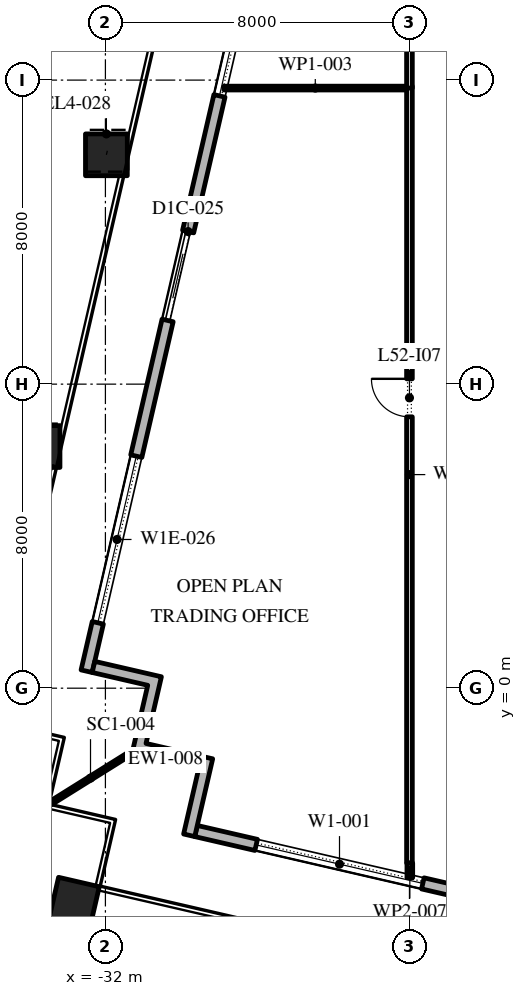
"""IFC4 building model, lengths in metres.
Left out: names, types, materials, properties, quantities, classifications, styles, units other than length and angle.
Written with IfcOpenShell. Run it as: python <this file> out.ifc"""

import sys

from ifc_helpers import new_model, si_unit, direction, frame, frame_2d, origin, origin_2d, place, context, subcontext, project, spatial, polyline, rectangle, outline, extrude, element, fill, save


model = new_model("IFC4")
c1 = context("Model", 3, precision=1e-05, world=origin(), true_north=direction((0.0, 1.0)))
c2 = subcontext(c1, "Body", "Model", "MODEL_VIEW")
j1 = project(units=[si_unit("LENGTHUNIT", "METRE"), si_unit("PLANEANGLEUNIT", "RADIAN")], contexts=[c1])
p1 = place(None, origin())
s1 = spatial("IfcSite", under=j1, at=p1, CompositionType="ELEMENT")
p2 = place(p1, origin())
s2 = spatial("IfcBuilding", under=s1, at=p2, CompositionType="ELEMENT")
p3 = place(p2, frame((0.0, 0.0, 243.0)))
s3 = spatial("IfcBuildingStorey", under=s2, at=p3, CompositionType="ELEMENT", Elevation=243.0)
p4 = place(p3, frame((-32.821, -5.635, 0.0), z_axis=(0.0, 0.0, 1.0), x_axis=(0.974370064785, -0.224951054344, 0.0)))
e1 = element("IfcColumn", 1, at=p4, inside=s3, PredefinedType="COLUMN", context=c2, shape_type="SweptSolid", body=[
    extrude(rectangle(XDim=1.1, YDim=1.1, at=origin_2d()), origin(), (0.0, 0.0, 1.0), 4.2),
])
p5 = place(p3, frame((-31.974, 14.034, 0.0), z_axis=(0.005810975449, 0.025335852957, 0.999662106474), x_axis=(-0.974691740237, 0.22355315143, 0.0)))
e2 = element("IfcColumn", 2, at=p5, inside=s3, PredefinedType="COLUMN", context=c2, shape_type="SweptSolid", body=[
    extrude(rectangle(XDim=1.1, YDim=1.1, at=origin_2d()), origin(), (0.0, 0.0, 1.0), 4.201),
])
p6 = place(p3, frame((-33.746, 6.358, 0.0), z_axis=(0.002964348167, 0.012671135303, 0.9999153239), x_axis=(-0.973709261374, 0.227794368487, 0.0)))
e3 = element("IfcColumn", 3, at=p6, inside=s3, PredefinedType="COLUMN", context=c2, shape_type="SweptSolid", body=[
    extrude(rectangle(XDim=1.1, YDim=1.1, at=origin_2d()), origin(), (0.0, 0.0, 1.0), 4.2),
])
p7 = place(p3, frame((-29.616, -3.758, 0.0), z_axis=(0.0, 0.0, 1.0), x_axis=(0.974370532314, -0.224949029246, 0.0)))
e4 = element("IfcWall", 4, at=p7, inside=s3, PredefinedType="STANDARD", context=c2, shape_type="SweptSolid", body=[
    extrude(rectangle(XDim=48.0, YDim=0.3, at=frame_2d((24.0, 0.0))), origin(), (0.0, 0.0, 1.0), 4.0),
])
p8 = place(p7, frame((1.625, 0.0, 0.45)))
e5 = element("IfcOpeningElement", 5, at=p8, cuts=e4, PredefinedType="OPENING", context=c2, shape_type="SweptSolid", body=[
    extrude(rectangle(XDim=4.5, YDim=3.05, at=frame_2d((2.25, 1.525))), frame((0.0, 0.16, 0.0), z_axis=(0.0, -1.0, 0.0), x_axis=(1.0, 0.0, 0.0)), (0.0, 0.0, 1.0), 0.32),
])
p9 = place(p7, frame((10.575, 0.0, 0.0)))
e6 = element("IfcOpeningElement", 6, at=p9, cuts=e4, PredefinedType="OPENING", context=c2, shape_type="SweptSolid", body=[
    extrude(rectangle(XDim=2.4, YDim=3.5, at=frame_2d((1.2, 1.75))), frame((0.0, 0.16, 0.0), z_axis=(0.0, -1.0, 0.0), x_axis=(1.0, 0.0, 0.0)), (0.0, 0.0, 1.0), 0.32),
])
p10 = place(p7, frame((17.575, 0.0, 0.45)))
e7 = element("IfcOpeningElement", 7, at=p10, cuts=e4, PredefinedType="OPENING", context=c2, shape_type="SweptSolid", body=[
    extrude(rectangle(XDim=4.5, YDim=3.0, at=frame_2d((2.25, 1.5))), frame((0.0, 0.16, 0.0), z_axis=(0.0, -1.0, 0.0), x_axis=(1.0, 0.0, 0.0)), (0.0, 0.0, 1.0), 0.32),
])
p11 = place(p7, frame((25.625, 0.0, 0.45)))
e8 = element("IfcOpeningElement", 8, at=p11, cuts=e4, PredefinedType="OPENING", context=c2, shape_type="SweptSolid", body=[
    extrude(rectangle(XDim=4.5, YDim=3.05, at=frame_2d((2.25, 1.525))), frame((0.0, 0.16, 0.0), z_axis=(0.0, -1.0, 0.0), x_axis=(1.0, 0.0, 0.0)), (0.0, 0.0, 1.0), 0.32),
])
p12 = place(p7, frame((33.675, 0.0, 0.45)))
e9 = element("IfcOpeningElement", 9, at=p12, cuts=e4, PredefinedType="OPENING", context=c2, shape_type="SweptSolid", body=[
    extrude(rectangle(XDim=4.5, YDim=2.825, at=frame_2d((2.25, 1.413))), frame((0.0, 0.16, 0.0), z_axis=(0.0, -1.0, 0.0), x_axis=(1.0, 0.0, 0.0)), (0.0, 0.0, 1.0), 0.32),
])
p13 = place(p7, frame((42.775, 0.0, 0.0)))
e10 = element("IfcOpeningElement", 10, at=p13, cuts=e4, PredefinedType="OPENING", context=c2, shape_type="SweptSolid", body=[
    extrude(rectangle(XDim=2.4, YDim=3.5, at=frame_2d((1.2, 1.75))), frame((0.0, 0.16, 0.0), z_axis=(0.0, -1.0, 0.0), x_axis=(1.0, 0.0, 0.0)), (0.0, 0.0, 1.0), 0.32),
])
p14 = place(p3, frame((-21.359, 48.678, 0.0), z_axis=(0.0, 0.0, 1.0), x_axis=(-0.224949198343, -0.974370493275, 0.0)))
e11 = element("IfcWall", 11, at=p14, inside=s3, PredefinedType="STANDARD", context=c2, shape_type="SweptSolid", body=[
    extrude(rectangle(XDim=49.5, YDim=0.3, at=frame_2d((24.75, 0.0))), origin(), (0.0, 0.0, 1.0), 4.0),
])
p15 = place(p14, frame((1.157, 0.0, 0.45)))
e12 = element("IfcOpeningElement", 12, at=p15, cuts=e11, PredefinedType="OPENING", context=c2, shape_type="SweptSolid", body=[
    extrude(rectangle(XDim=4.5, YDim=3.05, at=frame_2d((2.25, 1.525))), frame((0.0, 0.16, 0.0), z_axis=(0.0, -1.0, 0.0), x_axis=(1.0, 0.0, 0.0)), (0.0, 0.0, 1.0), 0.32),
])
p16 = place(p14, frame((9.171, 0.0, 0.0)))
e13 = element("IfcOpeningElement", 13, at=p16, cuts=e11, PredefinedType="OPENING", context=c2, shape_type="SweptSolid", body=[
    extrude(rectangle(XDim=2.4, YDim=3.5, at=frame_2d((1.2, 1.75))), frame((0.0, 0.16, 0.0), z_axis=(0.0, -1.0, 0.0), x_axis=(1.0, 0.0, 0.0)), (0.0, 0.0, 1.0), 0.32),
])
p17 = place(p14, frame((15.236, 0.0, 0.45)))
e14 = element("IfcOpeningElement", 14, at=p17, cuts=e11, PredefinedType="OPENING", context=c2, shape_type="SweptSolid", body=[
    extrude(rectangle(XDim=4.5, YDim=3.05, at=frame_2d((2.25, 1.525))), frame((0.0, 0.16, 0.0), z_axis=(0.0, -1.0, 0.0), x_axis=(1.0, 0.0, 0.0)), (0.0, 0.0, 1.0), 0.32),
])
p18 = place(p14, frame((22.35, 0.0, 0.45)))
e15 = element("IfcOpeningElement", 15, at=p18, cuts=e11, PredefinedType="OPENING", context=c2, shape_type="SweptSolid", body=[
    extrude(rectangle(XDim=4.5, YDim=3.05, at=frame_2d((2.25, 1.525))), frame((0.0, 0.16, 0.0), z_axis=(0.0, -1.0, 0.0), x_axis=(1.0, 0.0, 0.0)), (0.0, 0.0, 1.0), 0.32),
])
p19 = place(p14, frame((29.464, 0.0, 0.45)))
e16 = element("IfcOpeningElement", 16, at=p19, cuts=e11, PredefinedType="OPENING", context=c2, shape_type="SweptSolid", body=[
    extrude(rectangle(XDim=4.5, YDim=3.05, at=frame_2d((2.25, 1.525))), frame((0.0, 0.16, 0.0), z_axis=(0.0, -1.0, 0.0), x_axis=(1.0, 0.0, 0.0)), (0.0, 0.0, 1.0), 0.32),
])
p20 = place(p14, frame((37.628, 0.0, 0.0)))
e17 = element("IfcOpeningElement", 17, at=p20, cuts=e11, PredefinedType="OPENING", context=c2, shape_type="SweptSolid", body=[
    extrude(rectangle(XDim=2.4, YDim=3.325, at=frame_2d((1.2, 1.663))), frame((0.0, 0.16, 0.0), z_axis=(0.0, -1.0, 0.0), x_axis=(1.0, 0.0, 0.0)), (0.0, 0.0, 1.0), 0.32),
])
p21 = place(p14, frame((43.693, 0.0, 0.45)))
e18 = element("IfcOpeningElement", 18, at=p21, cuts=e11, PredefinedType="OPENING", context=c2, shape_type="SweptSolid", body=[
    extrude(rectangle(XDim=4.5, YDim=2.825, at=frame_2d((2.25, 1.413))), frame((0.0, 0.16, 0.0), z_axis=(0.0, -1.0, 0.0), x_axis=(1.0, 0.0, 0.0)), (0.0, 0.0, 1.0), 0.32),
])
p22 = place(p3, origin())
e19 = element("IfcWall", 19, at=p22, inside=s3, PredefinedType="STANDARD", context=c2, shape_type="SweptSolid", body=[
    extrude(outline(polyline([(-31.291, -1.678), (-30.886, 0.076), (-32.348, 0.413), (-32.28, 0.705), (-30.526, 0.301), (-30.931, -1.453), (-29.177, -1.858), (-29.65, -3.905), (-29.942, -3.837), (-29.537, -2.083), (-31.291, -1.678)])), origin(), (0.0, 0.0, 1.0), 4.0),
])
p23 = place(p3, frame((-31.291, -1.678, -0.05), z_axis=(0.0, 0.0, 1.0), x_axis=(-0.84807753525, -0.529872148923, 0.0)))
e20 = element("IfcWall", 20, at=p23, inside=s3, PredefinedType="STANDARD", context=c2, shape_type="SweptSolid", body=[
    extrude(rectangle(XDim=2.596, YDim=0.1, at=frame_2d((1.298, 0.0))), origin(), (0.0, 0.0, 1.0), 4.05),
])
p24 = place(p3, frame((-24.0, -4.6, 0.0), z_axis=(0.0, 0.0, 1.0), x_axis=(0.0, 1.0, 0.0)))
e21 = element("IfcWall", 21, at=p24, inside=s3, PredefinedType="PARTITIONING", context=c2, shape_type="SweptSolid", body=[
    extrude(rectangle(XDim=20.44, YDim=0.15, at=frame_2d((10.22, 0.0))), origin(), (0.0, 0.0, 1.0), 4.0),
])
p25 = place(p24, frame((11.74, 0.0, 0.0)))
e22 = element("IfcOpeningElement", 22, at=p25, cuts=e21, PredefinedType="OPENING", context=c2, shape_type="SweptSolid", body=[
    extrude(rectangle(XDim=1.0, YDim=2.1, at=frame_2d((0.5, 1.05))), frame((0.0, 0.085, 0.0), z_axis=(0.0, -1.0, 0.0), x_axis=(1.0, 0.0, 0.0)), (0.0, 0.0, 1.0), 0.17),
])
p26 = place(p3, frame((-24.075, 15.79, 0.0), z_axis=(0.0, 0.0, 1.0), x_axis=(-1.0, 0.0, 0.0)))
e23 = element("IfcWall", 23, at=p26, inside=s3, PredefinedType="PARTITIONING", context=c2, shape_type="SweptSolid", body=[
    extrude(rectangle(XDim=4.805, YDim=0.1, at=frame_2d((2.402, 0.0))), origin(), (0.0, 0.0, 1.0), 4.0),
])
p27 = place(p3, frame((-24.0, 15.79, 0.0), z_axis=(0.0, 0.0, 1.0), x_axis=(0.0, 1.0, 0.0)))
e24 = element("IfcWall", 24, at=p27, inside=s3, PredefinedType="PARTITIONING", context=c2, shape_type="SweptSolid", body=[
    extrude(rectangle(XDim=13.945, YDim=0.15, at=frame_2d((6.973, 0.0))), origin(), (0.0, 0.0, 1.0), 4.0),
])
p28 = place(p27, frame((7.72, 0.0, 0.0)))
e25 = element("IfcOpeningElement", 25, at=p28, cuts=e24, PredefinedType="OPENING", context=c2, shape_type="SweptSolid", body=[
    extrude(rectangle(XDim=1.0, YDim=2.1, at=frame_2d((0.5, 1.05))), frame((0.0, 0.085, 0.0), z_axis=(0.0, -1.0, 0.0), x_axis=(1.0, 0.0, 0.0)), (0.0, 0.0, 1.0), 0.17),
])
p29 = place(p3, frame((-23.99, -4.986, 0.0), z_axis=(0.0, 0.0, 1.0), x_axis=(0.0, 1.0, 0.0)))
e26 = element("IfcWall", 26, at=p29, inside=s3, PredefinedType="PARTITIONING", context=c2, shape_type="SweptSolid", body=[
    extrude(rectangle(XDim=0.386, YDim=0.15, at=frame_2d((0.193, 0.0))), origin(), (0.0, 0.0, 1.0), 4.0),
])
p30 = place(p8, origin())
e27 = element("IfcWindow", 27, at=p30, inside=s3, PartitioningType="DOUBLE_PANEL_VERTICAL", PredefinedType="WINDOW", context=c2, shape_type="SweptSolid", body=[
    extrude(rectangle(XDim=4.5, YDim=3.05, at=frame_2d((2.25, 1.525))), frame((0.0, 0.03, 0.0), z_axis=(0.0, -1.0, 0.0), x_axis=(1.0, 0.0, 0.0)), (0.0, 0.0, 1.0), 0.06),
])
fill(e5, e27)
p31 = place(p19, origin())
e28 = element("IfcWindow", 28, at=p31, inside=s3, PartitioningType="DOUBLE_PANEL_VERTICAL", PredefinedType="WINDOW", context=c2, shape_type="SweptSolid", body=[
    extrude(rectangle(XDim=4.5, YDim=3.05, at=frame_2d((2.25, 1.525))), frame((0.0, 0.03, 0.0), z_axis=(0.0, -1.0, 0.0), x_axis=(1.0, 0.0, 0.0)), (0.0, 0.0, 1.0), 0.06),
])
fill(e16, e28)
p32 = place(p20, origin())
e29 = element("IfcDoor", 29, at=p32, inside=s3, OperationType="DOUBLE_DOOR_SLIDING", PredefinedType="DOOR", context=c2, shape_type="SweptSolid", body=[
    extrude(rectangle(XDim=2.4, YDim=3.325, at=frame_2d((1.2, 1.663))), frame((0.0, 0.025, 0.0), z_axis=(0.0, -1.0, 0.0), x_axis=(1.0, 0.0, 0.0)), (0.0, 0.0, 1.0), 0.05),
])
fill(e17, e29)
p33 = place(p21, origin())
e30 = element("IfcWindow", 30, at=p33, inside=s3, PartitioningType="DOUBLE_PANEL_VERTICAL", PredefinedType="WINDOW", context=c2, shape_type="SweptSolid", body=[
    extrude(rectangle(XDim=4.5, YDim=2.825, at=frame_2d((2.25, 1.413))), frame((0.0, 0.03, 0.0), z_axis=(0.0, -1.0, 0.0), x_axis=(1.0, 0.0, 0.0)), (0.0, 0.0, 1.0), 0.06),
])
fill(e18, e30)
p34 = place(p25, origin())
e31 = element("IfcDoor", 31, at=p34, inside=s3, OperationType="SINGLE_SWING_LEFT", PredefinedType="DOOR", context=c2, shape_type="SweptSolid", body=[
    extrude(rectangle(XDim=1.0, YDim=2.1, at=frame_2d((0.5, 1.05))), frame((0.0, 0.025, 0.0), z_axis=(0.0, -1.0, 0.0), x_axis=(1.0, 0.0, 0.0)), (0.0, 0.0, 1.0), 0.05),
])
fill(e22, e31)
save(model, sys.argv[1])
